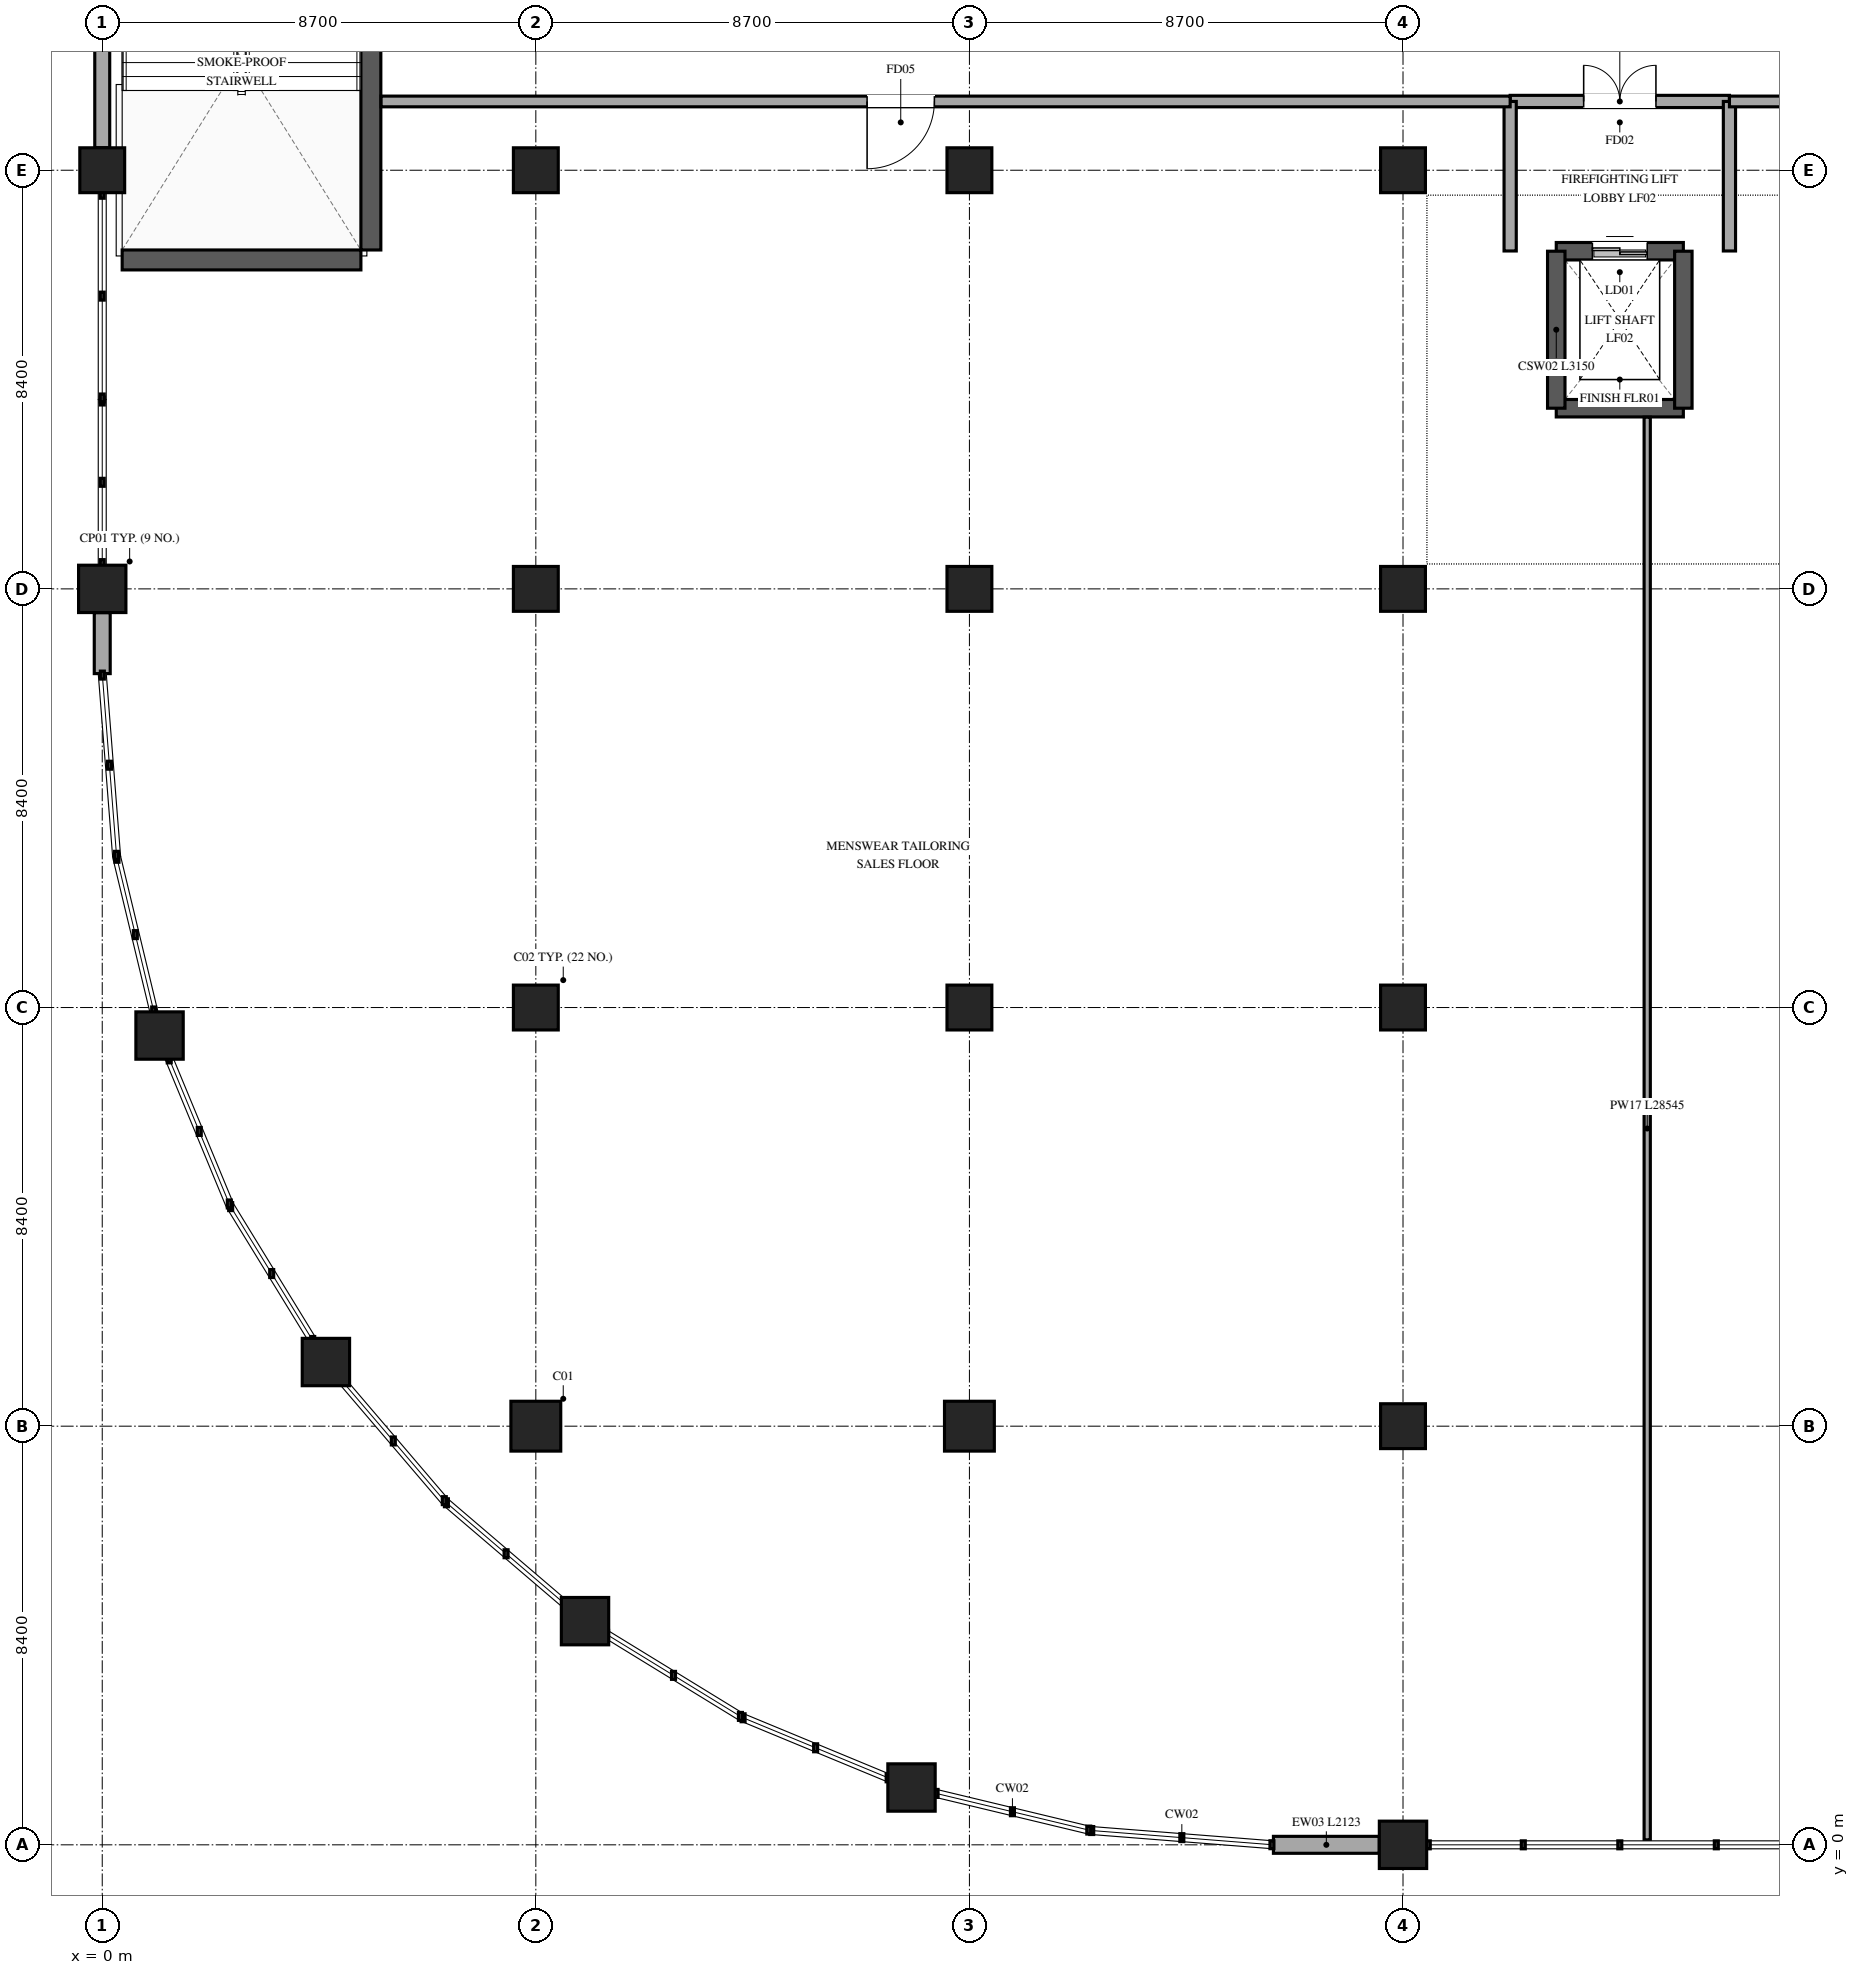
"""IFC4 building model, lengths in metres.
Left out: names, types, materials, properties, quantities, classifications, styles, units other than length and angle.
Written with IfcOpenShell. Run it as: python <this file> out.ifc"""

import sys

from ifc_helpers import new_model, si_unit, direction, frame, frame_2d, origin, origin_2d, place, context, subcontext, project, spatial, rectangle, circle, extrude, element, fill, save


model = new_model("IFC4")
c1 = context("Model", 3, precision=1e-05, world=origin(), true_north=direction((0.0, 1.0)))
c2 = subcontext(c1, "Body", "Model", "MODEL_VIEW")
j1 = project(units=[si_unit("LENGTHUNIT", "METRE"), si_unit("PLANEANGLEUNIT", "RADIAN")], contexts=[c1])
p1 = place(None, origin())
s1 = spatial("IfcSite", under=j1, at=p1, CompositionType="ELEMENT")
p2 = place(p1, origin())
s2 = spatial("IfcBuilding", under=s1, at=p2, CompositionType="ELEMENT")
p3 = place(p2, frame((0.0, 0.0, 11.4)))
s3 = spatial("IfcBuildingStorey", under=s2, at=p3, CompositionType="ELEMENT", Elevation=11.4)
p4 = place(p3, frame((0.0, 25.2, 0.0), z_axis=(0.0, 0.0, 1.0), x_axis=(1.0, 0.0, 0.0)))
e1 = element("IfcColumn", 1, at=p4, inside=s3, PredefinedType="PILASTER", context=c2, shape_type="SweptSolid", body=[
    extrude(circle(Radius=0.475, at=origin_2d()), origin(), (0.0, 0.0, 1.0), 5.1),
])
p5 = place(p3, frame((0.0, 33.6, 0.0), z_axis=(0.0, 0.0, 1.0), x_axis=(1.0, 0.0, 0.0)))
e2 = element("IfcColumn", 2, at=p5, inside=s3, PredefinedType="COLUMN", context=c2, shape_type="SweptSolid", body=[
    extrude(rectangle(XDim=0.9, YDim=0.9, at=origin_2d()), origin(), (0.0, 0.0, 1.0), 5.1),
])
p6 = place(p3, frame((8.7, 8.4, 0.0), z_axis=(0.0, 0.0, 1.0), x_axis=(1.0, 0.0, 0.0)))
e3 = element("IfcColumn", 3, at=p6, inside=s3, PredefinedType="COLUMN", context=c2, shape_type="SweptSolid", body=[
    extrude(rectangle(XDim=1.0, YDim=1.0, at=origin_2d()), origin(), (0.0, 0.0, 1.0), 5.1),
])
for number, where, z_axis, x_axis in (
    (4, (8.7, 16.8, 0.0), (0.0, 0.0, 1.0), (1.0, 0.0, 0.0)),
    (5, (8.7, 25.2, 0.0), (0.0, 0.0, 1.0), (1.0, 0.0, 0.0)),
    (6, (8.7, 33.6, 0.0), (0.0, 0.0, 1.0), (1.0, 0.0, 0.0)),
):
    element("IfcColumn", number, at=place(p3, frame(where, z_axis=z_axis, x_axis=x_axis)), inside=s3, PredefinedType="COLUMN", context=c2, shape_type="SweptSolid", body=[
        extrude(rectangle(XDim=0.9, YDim=0.9, at=origin_2d()), origin(), (0.0, 0.0, 1.0), 5.1),
    ])
p7 = place(p3, frame((17.4, 8.4, 0.0), z_axis=(0.0, 0.0, 1.0), x_axis=(1.0, 0.0, 0.0)))
e7 = element("IfcColumn", 7, at=p7, inside=s3, PredefinedType="COLUMN", context=c2, shape_type="SweptSolid", body=[
    extrude(rectangle(XDim=1.0, YDim=1.0, at=origin_2d()), origin(), (0.0, 0.0, 1.0), 5.1),
])
for number, where, z_axis, x_axis in (
    (8, (17.4, 16.8, 0.0), (0.0, 0.0, 1.0), (1.0, 0.0, 0.0)),
    (9, (17.4, 25.2, 0.0), (0.0, 0.0, 1.0), (1.0, 0.0, 0.0)),
    (10, (17.4, 33.6, 0.0), (0.0, 0.0, 1.0), (1.0, 0.0, 0.0)),
):
    element("IfcColumn", number, at=place(p3, frame(where, z_axis=z_axis, x_axis=x_axis)), inside=s3, PredefinedType="COLUMN", context=c2, shape_type="SweptSolid", body=[
        extrude(rectangle(XDim=0.9, YDim=0.9, at=origin_2d()), origin(), (0.0, 0.0, 1.0), 5.1),
    ])
p8 = place(p3, frame((26.1, 0.0, 0.0), z_axis=(0.0, 0.0, 1.0), x_axis=(1.0, 0.0, 0.0)))
e11 = element("IfcColumn", 11, at=p8, inside=s3, PredefinedType="PILASTER", context=c2, shape_type="SweptSolid", body=[
    extrude(circle(Radius=0.475, at=origin_2d()), origin(), (0.0, 0.0, 1.0), 5.1),
])
for number, where, z_axis, x_axis in (
    (12, (26.1, 8.4, 0.0), (0.0, 0.0, 1.0), (1.0, 0.0, 0.0)),
    (13, (26.1, 16.8, 0.0), (0.0, 0.0, 1.0), (1.0, 0.0, 0.0)),
    (14, (26.1, 25.2, 0.0), (0.0, 0.0, 1.0), (1.0, 0.0, 0.0)),
    (15, (26.1, 33.6, 0.0), (0.0, 0.0, 1.0), (1.0, 0.0, 0.0)),
):
    element("IfcColumn", number, at=place(p3, frame(where, z_axis=z_axis, x_axis=x_axis)), inside=s3, PredefinedType="COLUMN", context=c2, shape_type="SweptSolid", body=[
        extrude(rectangle(XDim=0.9, YDim=0.9, at=origin_2d()), origin(), (0.0, 0.0, 1.0), 5.1),
    ])
for number, where, z_axis, x_axis in (
    (16, (1.15, 16.238, 0.0), (0.0, 0.0, 1.0), (1.0, 0.0, 0.0)),
    (17, (4.488, 9.687, 0.0), (0.0, 0.0, 1.0), (1.0, 0.0, 0.0)),
    (18, (9.687, 4.488, 0.0), (0.0, 0.0, 1.0), (1.0, 0.0, 0.0)),
    (19, (16.238, 1.15, 0.0), (0.0, 0.0, 1.0), (1.0, 0.0, 0.0)),
):
    element("IfcColumn", number, at=place(p3, frame(where, z_axis=z_axis, x_axis=x_axis)), inside=s3, PredefinedType="PILASTER", context=c2, shape_type="SweptSolid", body=[
        extrude(circle(Radius=0.475, at=origin_2d()), origin(), (0.0, 0.0, 1.0), 5.1),
    ])
p9 = place(p3, frame((25.623, 0.0, 0.0), z_axis=(0.0, 0.0, 1.0), x_axis=(-1.0, 0.0, 0.0)))
e20 = element("IfcWall", 20, at=p9, inside=s3, PredefinedType="STANDARD", context=c2, shape_type="SweptSolid", body=[
    extrude(rectangle(XDim=2.123, YDim=0.34, at=frame_2d((1.062, 0.0))), origin(), (0.0, 0.0, 1.0), 4.155),
])
p10 = place(p3, frame((0.0, 23.5, 0.0), z_axis=(0.0, 0.0, 1.0), x_axis=(0.0, 1.0, 0.0)))
e21 = element("IfcWall", 21, at=p10, inside=s3, PredefinedType="STANDARD", context=c2, shape_type="SweptSolid", body=[
    extrude(rectangle(XDim=1.223, YDim=0.32, at=frame_2d((0.611, 0.0))), origin(), (0.0, 0.0, 1.0), 4.155),
])
p11 = place(p3, frame((0.0, 34.052, 0.0), z_axis=(0.0, 0.0, 1.0), x_axis=(0.0, 1.0, 0.0)))
e22 = element("IfcWall", 22, at=p11, inside=s3, PredefinedType="STANDARD", context=c2, shape_type="SweptSolid", body=[
    extrude(rectangle(XDim=7.496, YDim=0.3, at=frame_2d((3.748, 0.0))), origin(), (0.0, 0.0, 1.0), 4.79),
])
p12 = place(p3, frame((5.39, 42.0, 0.0), z_axis=(0.0, 0.0, 1.0), x_axis=(0.0, -1.0, 0.0)))
e23 = element("IfcWall", 23, at=p12, inside=s3, PredefinedType="SHEAR", context=c2, shape_type="SweptSolid", body=[
    extrude(rectangle(XDim=10.0, YDim=0.4, at=frame_2d((5.0, 0.0))), origin(), (0.0, 0.0, 1.0), 5.1),
])
p13 = place(p12, frame((0.41, 0.0, 0.0)))
e24 = element("IfcOpeningElement", 24, at=p13, cuts=e23, PredefinedType="OPENING", context=c2, shape_type="SweptSolid", body=[
    extrude(rectangle(XDim=1.5, YDim=2.2, at=frame_2d((0.75, 1.1))), frame((0.0, 0.21, 0.0), z_axis=(0.0, -1.0, 0.0), x_axis=(1.0, 0.0, 0.0)), (0.0, 0.0, 1.0), 0.42),
])
p14 = place(p3, frame((5.19, 31.8, 0.0), z_axis=(0.0, 0.0, 1.0), x_axis=(-1.0, 0.0, 0.0)))
e25 = element("IfcWall", 25, at=p14, inside=s3, PredefinedType="SHEAR", context=c2, shape_type="SweptSolid", body=[
    extrude(rectangle(XDim=4.79, YDim=0.4, at=frame_2d((2.395, 0.0))), origin(), (0.0, 0.0, 1.0), 5.1),
])
p15 = place(p3, frame((29.175, 31.975, 0.0), z_axis=(0.0, 0.0, 1.0), x_axis=(1.0, 0.0, 0.0)))
e26 = element("IfcWall", 26, at=p15, inside=s3, PredefinedType="SHEAR", context=c2, shape_type="SweptSolid", body=[
    extrude(rectangle(XDim=2.55, YDim=0.35, at=frame_2d((1.275, 0.0))), origin(), (0.0, 0.0, 1.0), 5.1),
])
p16 = place(p15, frame((0.725, 0.0, 0.0)))
e27 = element("IfcOpeningElement", 27, at=p16, cuts=e26, PredefinedType="OPENING", context=c2, shape_type="SweptSolid", body=[
    extrude(rectangle(XDim=1.1, YDim=2.2, at=frame_2d((0.55, 1.1))), frame((0.0, 0.185, 0.0), z_axis=(0.0, -1.0, 0.0), x_axis=(1.0, 0.0, 0.0)), (0.0, 0.0, 1.0), 0.37),
])
p17 = place(p3, frame((31.725, 28.825, 0.0), z_axis=(0.0, 0.0, 1.0), x_axis=(-1.0, 0.0, 0.0)))
e28 = element("IfcWall", 28, at=p17, inside=s3, PredefinedType="SHEAR", context=c2, shape_type="SweptSolid", body=[
    extrude(rectangle(XDim=2.55, YDim=0.35, at=frame_2d((1.275, 0.0))), origin(), (0.0, 0.0, 1.0), 5.1),
])
for number, where, z_axis, x_axis in (
    (29, (29.175, 28.825, 0.0), (0.0, 0.0, 1.0), (0.0, 1.0, 0.0)),
    (30, (31.725, 31.975, 0.0), (0.0, 0.0, 1.0), (0.0, -1.0, 0.0)),
):
    element("IfcWall", number, at=place(p3, frame(where, z_axis=z_axis, x_axis=x_axis)), inside=s3, PredefinedType="SHEAR", context=c2, shape_type="SweptSolid", body=[
        extrude(rectangle(XDim=3.15, YDim=0.35, at=frame_2d((1.575, 0.0))), origin(), (0.0, 0.0, 1.0), 5.1),
    ])
p18 = place(p3, frame((28.25, 34.98, 0.0), z_axis=(0.0, 0.0, 1.0), x_axis=(1.0, 0.0, 0.0)))
e31 = element("IfcWall", 31, at=p18, inside=s3, PredefinedType="STANDARD", context=c2, shape_type="SweptSolid", body=[
    extrude(rectangle(XDim=4.4, YDim=0.245, at=frame_2d((2.2, 0.0))), origin(), (0.0, 0.0, 1.0), 4.76),
])
p19 = place(p18, frame((1.475, 0.0, 0.0)))
e32 = element("IfcOpeningElement", 32, at=p19, cuts=e31, PredefinedType="OPENING", context=c2, shape_type="SweptSolid", body=[
    extrude(rectangle(XDim=1.45, YDim=2.2, at=frame_2d((0.725, 1.1))), frame((0.0, 0.133, 0.0), z_axis=(0.0, -1.0, 0.0), x_axis=(1.0, 0.0, 0.0)), (0.0, 0.0, 1.0), 0.265),
])
for number, where, z_axis, x_axis in (
    (33, (28.25, 31.98, 0.0), (0.0, 0.0, 1.0), (0.0, 1.0, 0.0)),
    (34, (32.65, 34.98, 0.0), (0.0, 0.0, 1.0), (0.0, -1.0, 0.0)),
):
    element("IfcWall", number, at=place(p3, frame(where, z_axis=z_axis, x_axis=x_axis)), inside=s3, PredefinedType="STANDARD", context=c2, shape_type="SweptSolid", body=[
        extrude(rectangle(XDim=3.0, YDim=0.245, at=frame_2d((1.5, 0.0))), origin(), (0.0, 0.0, 1.0), 4.06),
    ])
p20 = place(p3, frame((28.25, 34.98, 0.0), z_axis=(0.0, 0.0, 1.0), x_axis=(-1.0, 0.0, 0.0)))
e35 = element("IfcWall", 35, at=p20, inside=s3, PredefinedType="PARTITIONING", context=c2, shape_type="SweptSolid", body=[
    extrude(rectangle(XDim=22.655, YDim=0.215, at=frame_2d((11.328, 0.0))), origin(), (0.0, 0.0, 1.0), 4.06),
])
p21 = place(p20, frame((11.553, 0.0, 0.0)))
e36 = element("IfcOpeningElement", 36, at=p21, cuts=e35, PredefinedType="OPENING", context=c2, shape_type="SweptSolid", body=[
    extrude(rectangle(XDim=1.35, YDim=2.2, at=frame_2d((0.675, 1.1))), frame((0.0, 0.118, 0.0), z_axis=(0.0, -1.0, 0.0), x_axis=(1.0, 0.0, 0.0)), (0.0, 0.0, 1.0), 0.235),
])
p22 = place(p3, frame((44.6, 34.98, 0.0), z_axis=(0.0, 0.0, 1.0), x_axis=(-1.0, 0.0, 0.0)))
e37 = element("IfcWall", 37, at=p22, inside=s3, PredefinedType="PARTITIONING", context=c2, shape_type="SweptSolid", body=[
    extrude(rectangle(XDim=11.95, YDim=0.215, at=frame_2d((5.975, 0.0))), origin(), (0.0, 0.0, 1.0), 4.06),
])
p23 = place(p22, frame((5.3, 0.0, 0.0)))
e38 = element("IfcOpeningElement", 38, at=p23, cuts=e37, PredefinedType="OPENING", context=c2, shape_type="SweptSolid", body=[
    extrude(rectangle(XDim=1.35, YDim=2.2, at=frame_2d((0.675, 1.1))), frame((0.0, 0.118, 0.0), z_axis=(0.0, -1.0, 0.0), x_axis=(1.0, 0.0, 0.0)), (0.0, 0.0, 1.0), 0.235),
])
p24 = place(p3, frame((31.0, 28.645, 0.0), z_axis=(0.0, 0.0, 1.0), x_axis=(0.0, -1.0, 0.0)))
e39 = element("IfcWall", 39, at=p24, inside=s3, PredefinedType="PARTITIONING", context=c2, shape_type="SweptSolid", body=[
    extrude(rectangle(XDim=28.545, YDim=0.125, at=frame_2d((14.272, 0.0))), origin(), (0.0, 0.0, 1.0), 4.06),
])
p25 = place(p16, origin())
e40 = element("IfcDoor", 40, at=p25, inside=s3, OperationType="DOUBLE_DOOR_SLIDING", PredefinedType="DOOR", context=c2, shape_type="SweptSolid", body=[
    extrude(rectangle(XDim=1.1, YDim=2.2, at=frame_2d((0.55, 1.1))), frame((0.0, 0.025, 0.0), z_axis=(0.0, -1.0, 0.0), x_axis=(1.0, 0.0, 0.0)), (0.0, 0.0, 1.0), 0.05),
])
fill(e27, e40)
p26 = place(p19, origin())
e41 = element("IfcDoor", 41, at=p26, inside=s3, OperationType="DOUBLE_DOOR_SINGLE_SWING", PredefinedType="DOOR", context=c2, shape_type="SweptSolid", body=[
    extrude(rectangle(XDim=1.45, YDim=2.2, at=frame_2d((0.725, 1.1))), frame((0.0, 0.025, 0.0), z_axis=(0.0, -1.0, 0.0), x_axis=(1.0, 0.0, 0.0)), (0.0, 0.0, 1.0), 0.05),
])
fill(e32, e41)
p27 = place(p21, origin())
e42 = element("IfcDoor", 42, at=p27, inside=s3, OperationType="SINGLE_SWING_RIGHT", PredefinedType="DOOR", context=c2, shape_type="SweptSolid", body=[
    extrude(rectangle(XDim=1.35, YDim=2.2, at=frame_2d((0.675, 1.1))), frame((0.0, 0.025, 0.0), z_axis=(0.0, -1.0, 0.0), x_axis=(1.0, 0.0, 0.0)), (0.0, 0.0, 1.0), 0.05),
])
fill(e36, e42)
save(model, sys.argv[1])
